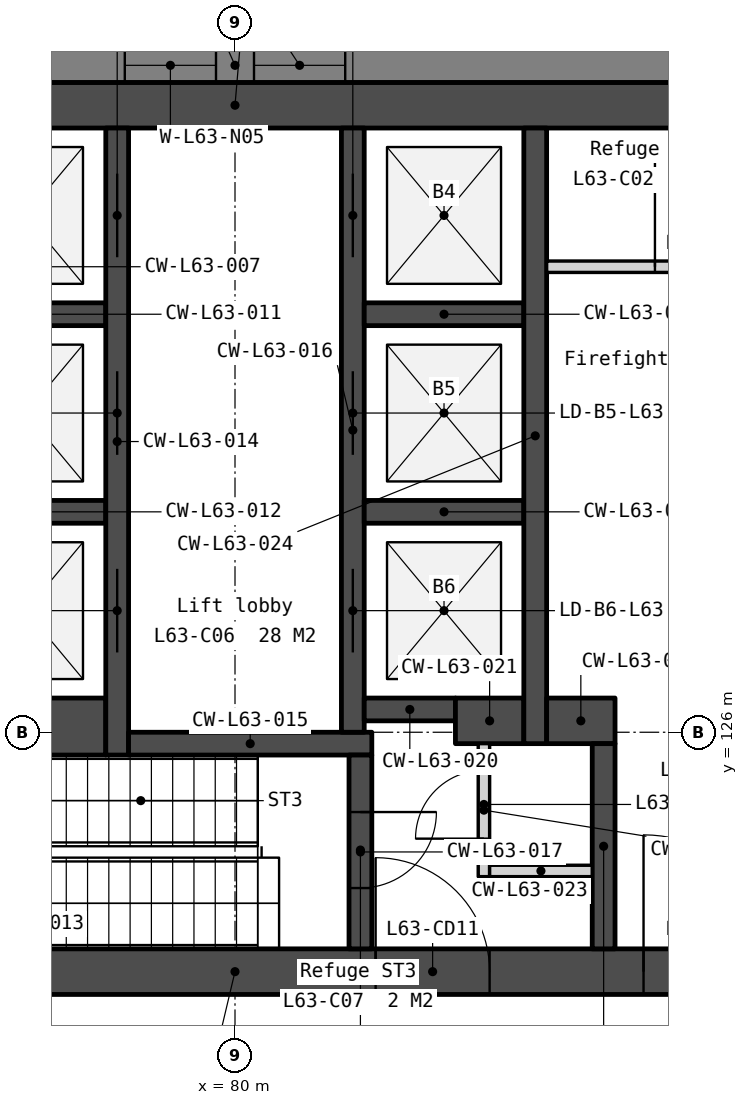
"""IFC4 building model, lengths in metres.
Left out: names, types, materials, properties, quantities, classifications, styles, units other than length and angle.
Written with IfcOpenShell. Run it as: python <this file> out.ifc"""

import sys

from ifc_helpers import new_model, si_unit, direction, frame, frame_2d, origin, place, context, subcontext, project, spatial, polyline, rectangle, outline, extrude, element, fill, save


model = new_model("IFC4")
c1 = context("Model", 3, precision=1e-05, world=origin(), true_north=direction((0.0, 1.0)))
c2 = subcontext(c1, "Body", "Model", "MODEL_VIEW")
j1 = project(units=[si_unit("LENGTHUNIT", "METRE"), si_unit("PLANEANGLEUNIT", "RADIAN")], contexts=[c1])
p1 = place(None, origin())
s1 = spatial("IfcSite", under=j1, at=p1, CompositionType="ELEMENT")
p2 = place(p1, origin())
s2 = spatial("IfcBuilding", under=s1, at=p2, CompositionType="ELEMENT")
p3 = place(p2, frame((0.0, 0.0, 258.2)))
s3 = spatial("IfcBuildingStorey", under=s2, at=p3, CompositionType="ELEMENT", Elevation=258.2)
p4 = place(p3, frame((69.0, 134.25, 0.0), z_axis=(0.0, 0.0, 1.0), x_axis=(1.0, 0.0, 0.0)))
e1 = element("IfcWall", 1, at=p4, inside=s3, PredefinedType="SOLIDWALL", context=c2, shape_type="SweptSolid", body=[
    extrude(rectangle(XDim=22.0, YDim=0.6, at=frame_2d((11.0, 0.0))), origin(), (0.0, 0.0, 1.0), 3.75),
])
p5 = place(p3, frame((69.0, 122.85, 0.0), z_axis=(0.0, 0.0, 1.0), x_axis=(1.0, 0.0, 0.0)))
e2 = element("IfcWall", 2, at=p5, inside=s3, PredefinedType="SOLIDWALL", context=c2, shape_type="SweptSolid", body=[
    extrude(rectangle(XDim=22.0, YDim=0.6, at=frame_2d((11.0, 0.0))), origin(), (0.0, 0.0, 1.0), 3.75),
])
p6 = place(p5, frame((16.375, 0.0, 0.0)))
e3 = element("IfcOpeningElement", 3, at=p6, cuts=e2, PredefinedType="OPENING", context=c2, shape_type="SweptSolid", body=[
    extrude(rectangle(XDim=1.8, YDim=2.1, at=frame_2d((0.9, 1.05))), frame((0.0, 0.31, 0.0), z_axis=(0.0, -1.0, 0.0), x_axis=(1.0, 0.0, 0.0)), (0.0, 0.0, 1.0), 0.62),
])
p7 = place(p5, frame((3.825, 0.0, 0.0)))
e4 = element("IfcOpeningElement", 4, at=p7, cuts=e2, PredefinedType="OPENING", context=c2, shape_type="SweptSolid", body=[
    extrude(rectangle(XDim=1.8, YDim=2.1, at=frame_2d((0.9, 1.05))), frame((0.0, 0.31, 0.0), z_axis=(0.0, -1.0, 0.0), x_axis=(1.0, 0.0, 0.0)), (0.0, 0.0, 1.0), 0.62),
])
p8 = place(p5, frame((12.85, 0.0, 0.0)))
e5 = element("IfcOpeningElement", 5, at=p8, cuts=e2, PredefinedType="OPENING", context=c2, shape_type="SweptSolid", body=[
    extrude(rectangle(XDim=1.5, YDim=2.1, at=frame_2d((0.75, 1.05))), frame((0.0, 0.31, 0.0), z_axis=(0.0, -1.0, 0.0), x_axis=(1.0, 0.0, 0.0)), (0.0, 0.0, 1.0), 0.62),
])
for number, where, z_axis, x_axis in (
    (6, (76.2, 131.5, 0.0), (0.0, 0.0, 1.0), (1.0, 0.0, 0.0)),
    (7, (76.2, 128.9, 0.0), (0.0, 0.0, 1.0), (1.0, 0.0, 0.0)),
):
    element("IfcWall", number, at=place(p3, frame(where, z_axis=z_axis, x_axis=x_axis)), inside=s3, PredefinedType="SOLIDWALL", context=c2, shape_type="SweptSolid", body=[
        extrude(rectangle(XDim=2.1, YDim=0.3, at=frame_2d((1.05, 0.0))), origin(), (0.0, 0.0, 1.0), 3.75),
    ])
p9 = place(p3, frame((76.2, 126.075, 0.0), z_axis=(0.0, 0.0, 1.0), x_axis=(1.0, 0.0, 0.0)))
e8 = element("IfcWall", 8, at=p9, inside=s3, PredefinedType="SOLIDWALL", context=c2, shape_type="SweptSolid", body=[
    extrude(rectangle(XDim=2.1, YDim=0.75, at=frame_2d((1.05, 0.0))), origin(), (0.0, 0.0, 1.0), 3.75),
])
p10 = place(p3, frame((78.45, 133.95, 0.0), z_axis=(0.0, 0.0, 1.0), x_axis=(0.0, -1.0, 0.0)))
e9 = element("IfcWall", 9, at=p10, inside=s3, PredefinedType="SOLIDWALL", context=c2, shape_type="SweptSolid", body=[
    extrude(rectangle(XDim=8.25, YDim=0.3, at=frame_2d((4.125, 0.0))), origin(), (0.0, 0.0, 1.0), 3.75),
])
p11 = place(p10, frame((0.6, 0.0, 0.0)))
e10 = element("IfcOpeningElement", 10, at=p11, cuts=e9, PredefinedType="OPENING", context=c2, shape_type="SweptSolid", body=[
    extrude(rectangle(XDim=1.1, YDim=2.1, at=frame_2d((0.55, 1.05))), frame((0.0, 0.16, 0.0), z_axis=(0.0, -1.0, 0.0), x_axis=(1.0, 0.0, 0.0)), (0.0, 0.0, 1.0), 0.32),
])
p12 = place(p10, frame((3.2, 0.0, 0.0)))
e11 = element("IfcOpeningElement", 11, at=p12, cuts=e9, PredefinedType="OPENING", context=c2, shape_type="SweptSolid", body=[
    extrude(rectangle(XDim=1.1, YDim=2.1, at=frame_2d((0.55, 1.05))), frame((0.0, 0.16, 0.0), z_axis=(0.0, -1.0, 0.0), x_axis=(1.0, 0.0, 0.0)), (0.0, 0.0, 1.0), 0.32),
])
p13 = place(p10, frame((5.8, 0.0, 0.0)))
e12 = element("IfcOpeningElement", 12, at=p13, cuts=e9, PredefinedType="OPENING", context=c2, shape_type="SweptSolid", body=[
    extrude(rectangle(XDim=1.1, YDim=2.1, at=frame_2d((0.55, 1.05))), frame((0.0, 0.16, 0.0), z_axis=(0.0, -1.0, 0.0), x_axis=(1.0, 0.0, 0.0)), (0.0, 0.0, 1.0), 0.32),
])
p14 = place(p3, frame((78.6, 125.85, 0.0), z_axis=(0.0, 0.0, 1.0), x_axis=(1.0, 0.0, 0.0)))
e13 = element("IfcWall", 13, at=p14, inside=s3, PredefinedType="SOLIDWALL", context=c2, shape_type="SweptSolid", body=[
    extrude(rectangle(XDim=3.2, YDim=0.3, at=frame_2d((1.6, 0.0))), origin(), (0.0, 0.0, 1.0), 3.75),
])
p15 = place(p3, frame((81.55, 133.95, 0.0), z_axis=(0.0, 0.0, 1.0), x_axis=(0.0, -1.0, 0.0)))
e14 = element("IfcWall", 14, at=p15, inside=s3, PredefinedType="SOLIDWALL", context=c2, shape_type="SweptSolid", body=[
    extrude(rectangle(XDim=7.95, YDim=0.3, at=frame_2d((3.975, 0.0))), origin(), (0.0, 0.0, 1.0), 3.75),
])
p16 = place(p15, frame((0.6, 0.0, 0.0)))
e15 = element("IfcOpeningElement", 15, at=p16, cuts=e14, PredefinedType="OPENING", context=c2, shape_type="SweptSolid", body=[
    extrude(rectangle(XDim=1.1, YDim=2.1, at=frame_2d((0.55, 1.05))), frame((0.0, 0.16, 0.0), z_axis=(0.0, -1.0, 0.0), x_axis=(1.0, 0.0, 0.0)), (0.0, 0.0, 1.0), 0.32),
])
p17 = place(p15, frame((3.2, 0.0, 0.0)))
e16 = element("IfcOpeningElement", 16, at=p17, cuts=e14, PredefinedType="OPENING", context=c2, shape_type="SweptSolid", body=[
    extrude(rectangle(XDim=1.1, YDim=2.1, at=frame_2d((0.55, 1.05))), frame((0.0, 0.16, 0.0), z_axis=(0.0, -1.0, 0.0), x_axis=(1.0, 0.0, 0.0)), (0.0, 0.0, 1.0), 0.32),
])
p18 = place(p15, frame((5.8, 0.0, 0.0)))
e17 = element("IfcOpeningElement", 17, at=p18, cuts=e14, PredefinedType="OPENING", context=c2, shape_type="SweptSolid", body=[
    extrude(rectangle(XDim=1.1, YDim=2.1, at=frame_2d((0.55, 1.05))), frame((0.0, 0.16, 0.0), z_axis=(0.0, -1.0, 0.0), x_axis=(1.0, 0.0, 0.0)), (0.0, 0.0, 1.0), 0.32),
])
p19 = place(p3, frame((81.65, 125.7, 0.0), z_axis=(0.0, 0.0, 1.0), x_axis=(0.0, -1.0, 0.0)))
e18 = element("IfcWall", 18, at=p19, inside=s3, PredefinedType="SOLIDWALL", context=c2, shape_type="SweptSolid", body=[
    extrude(rectangle(XDim=2.55, YDim=0.3, at=frame_2d((1.275, 0.0))), origin(), (0.0, 0.0, 1.0), 3.75),
])
p20 = place(p19, frame((0.75, 0.0, 0.0)))
e19 = element("IfcOpeningElement", 19, at=p20, cuts=e18, PredefinedType="OPENING", context=c2, shape_type="SweptSolid", body=[
    extrude(rectangle(XDim=1.0, YDim=2.1, at=frame_2d((0.5, 1.05))), frame((0.0, 0.16, 0.0), z_axis=(0.0, -1.0, 0.0), x_axis=(1.0, 0.0, 0.0)), (0.0, 0.0, 1.0), 0.32),
])
for number, where, z_axis, x_axis in (
    (20, (81.7, 131.5, 0.0), (0.0, 0.0, 1.0), (1.0, 0.0, 0.0)),
    (21, (81.7, 128.9, 0.0), (0.0, 0.0, 1.0), (1.0, 0.0, 0.0)),
):
    element("IfcWall", number, at=place(p3, frame(where, z_axis=z_axis, x_axis=x_axis)), inside=s3, PredefinedType="SOLIDWALL", context=c2, shape_type="SweptSolid", body=[
        extrude(rectangle(XDim=2.1, YDim=0.3, at=frame_2d((1.05, 0.0))), origin(), (0.0, 0.0, 1.0), 3.75),
    ])
p21 = place(p3, frame((81.7, 126.3, 0.0), z_axis=(0.0, 0.0, 1.0), x_axis=(1.0, 0.0, 0.0)))
e22 = element("IfcWall", 22, at=p21, inside=s3, PredefinedType="SOLIDWALL", context=c2, shape_type="SweptSolid", body=[
    extrude(rectangle(XDim=1.2, YDim=0.3, at=frame_2d((0.6, 0.0))), origin(), (0.0, 0.0, 1.0), 3.75),
])
p22 = place(p3, frame((82.9, 126.15, 0.0), z_axis=(0.0, 0.0, 1.0), x_axis=(1.0, 0.0, 0.0)))
e23 = element("IfcWall", 23, at=p22, inside=s3, PredefinedType="SOLIDWALL", context=c2, shape_type="SweptSolid", body=[
    extrude(rectangle(XDim=0.9, YDim=0.6, at=frame_2d((0.45, 0.0))), origin(), (0.0, 0.0, 1.0), 3.75),
])
p23 = place(p3, frame((83.275, 125.85, 0.0), z_axis=(0.0, 0.0, 1.0), x_axis=(0.0, -1.0, 0.0)))
e24 = element("IfcWall", 24, at=p23, inside=s3, PredefinedType="PARTITIONING", context=c2, shape_type="SweptSolid", body=[
    extrude(rectangle(XDim=1.75, YDim=0.15, at=frame_2d((0.875, 0.0))), origin(), (0.0, 0.0, 1.0), 3.75),
])
p24 = place(p23, frame((0.35, 0.0, 0.0)))
e25 = element("IfcOpeningElement", 25, at=p24, cuts=e24, PredefinedType="OPENING", context=c2, shape_type="SweptSolid", body=[
    extrude(rectangle(XDim=0.9, YDim=2.1, at=frame_2d((0.45, 1.05))), frame((0.0, 0.085, 0.0), z_axis=(0.0, -1.0, 0.0), x_axis=(1.0, 0.0, 0.0)), (0.0, 0.0, 1.0), 0.17),
])
p25 = place(p3, frame((83.35, 124.175, 0.0), z_axis=(0.0, 0.0, 1.0), x_axis=(1.0, 0.0, 0.0)))
e26 = element("IfcWall", 26, at=p25, inside=s3, PredefinedType="PARTITIONING", context=c2, shape_type="SweptSolid", body=[
    extrude(rectangle(XDim=1.35, YDim=0.15, at=frame_2d((0.675, 0.0))), origin(), (0.0, 0.0, 1.0), 3.75),
])
p26 = place(p3, frame((83.95, 133.95, 0.0), z_axis=(0.0, 0.0, 1.0), x_axis=(0.0, -1.0, 0.0)))
e27 = element("IfcWall", 27, at=p26, inside=s3, PredefinedType="SOLIDWALL", context=c2, shape_type="SweptSolid", body=[
    extrude(rectangle(XDim=8.1, YDim=0.3, at=frame_2d((4.05, 0.0))), origin(), (0.0, 0.0, 1.0), 3.75),
])
p27 = place(p3, frame((84.1, 132.125, 0.0), z_axis=(0.0, 0.0, 1.0), x_axis=(1.0, 0.0, 0.0)))
e28 = element("IfcWall", 28, at=p27, inside=s3, PredefinedType="PARTITIONING", context=c2, shape_type="SweptSolid", body=[
    extrude(rectangle(XDim=3.45, YDim=0.15, at=frame_2d((1.725, 0.0))), origin(), (0.0, 0.0, 1.0), 3.75),
])
p28 = place(p27, frame((1.425, 0.0, 0.0)))
e29 = element("IfcOpeningElement", 29, at=p28, cuts=e28, PredefinedType="OPENING", context=c2, shape_type="SweptSolid", body=[
    extrude(rectangle(XDim=1.5, YDim=2.1, at=frame_2d((0.75, 1.05))), frame((0.0, 0.085, 0.0), z_axis=(0.0, -1.0, 0.0), x_axis=(1.0, 0.0, 0.0)), (0.0, 0.0, 1.0), 0.17),
])
p29 = place(p3, frame((84.1, 126.15, 0.0), z_axis=(0.0, 0.0, 1.0), x_axis=(1.0, 0.0, 0.0)))
e30 = element("IfcWall", 30, at=p29, inside=s3, PredefinedType="SOLIDWALL", context=c2, shape_type="SweptSolid", body=[
    extrude(rectangle(XDim=0.9, YDim=0.6, at=frame_2d((0.45, 0.0))), origin(), (0.0, 0.0, 1.0), 3.75),
])
p30 = place(p3, frame((84.85, 125.85, 0.0), z_axis=(0.0, 0.0, 1.0), x_axis=(0.0, -1.0, 0.0)))
e31 = element("IfcWall", 31, at=p30, inside=s3, PredefinedType="SOLIDWALL", context=c2, shape_type="SweptSolid", body=[
    extrude(rectangle(XDim=2.7, YDim=0.3, at=frame_2d((1.35, 0.0))), origin(), (0.0, 0.0, 1.0), 3.75),
])
p31 = place(p3, frame((98.486, 134.775, -0.15), z_axis=(0.0, 0.0, 1.0), x_axis=(-1.0, 0.0, 0.0)))
e32 = element("IfcWall", 32, at=p31, inside=s3, PredefinedType="SOLIDWALL", context=c2, shape_type="SweptSolid", body=[
    extrude(outline(polyline([(36.972, 0.0), (36.972, 3.9), (0.0, 3.9), (0.0, 0.0), (36.972, 0.0)])), frame((0.0, 0.225, 0.0), z_axis=(0.0, -1.0, 0.0), x_axis=(1.0, 0.0, 0.0)), (0.0, 0.0, 1.0), 0.45),
])
p32 = place(p31, frame((0.715, 0.0, 0.95)))
e33 = element("IfcOpeningElement", 33, at=p32, cuts=e32, PredefinedType="OPENING", context=c2, shape_type="SweptSolid", body=[
    extrude(rectangle(XDim=1.2, YDim=2.2, at=frame_2d((0.6, 1.1))), frame((0.0, 0.235, 0.0), z_axis=(0.0, -1.0, 0.0), x_axis=(1.0, 0.0, 0.0)), (0.0, 0.0, 1.0), 0.47),
])
p33 = place(p31, frame((7.793, 0.0, 0.95)))
e34 = element("IfcOpeningElement", 34, at=p33, cuts=e32, PredefinedType="OPENING", context=c2, shape_type="SweptSolid", body=[
    extrude(rectangle(XDim=1.2, YDim=2.2, at=frame_2d((0.6, 1.1))), frame((0.0, 0.235, 0.0), z_axis=(0.0, -1.0, 0.0), x_axis=(1.0, 0.0, 0.0)), (0.0, 0.0, 1.0), 0.47),
])
p34 = place(p31, frame((9.493, 0.0, 0.95)))
e35 = element("IfcOpeningElement", 35, at=p34, cuts=e32, PredefinedType="OPENING", context=c2, shape_type="SweptSolid", body=[
    extrude(rectangle(XDim=1.2, YDim=2.2, at=frame_2d((0.6, 1.1))), frame((0.0, 0.235, 0.0), z_axis=(0.0, -1.0, 0.0), x_axis=(1.0, 0.0, 0.0)), (0.0, 0.0, 1.0), 0.47),
])
p35 = place(p31, frame((17.036, 0.0, 0.95)))
e36 = element("IfcOpeningElement", 36, at=p35, cuts=e32, PredefinedType="OPENING", context=c2, shape_type="SweptSolid", body=[
    extrude(rectangle(XDim=1.2, YDim=2.2, at=frame_2d((0.6, 1.1))), frame((0.0, 0.235, 0.0), z_axis=(0.0, -1.0, 0.0), x_axis=(1.0, 0.0, 0.0)), (0.0, 0.0, 1.0), 0.47),
])
p36 = place(p31, frame((18.736, 0.0, 0.95)))
e37 = element("IfcOpeningElement", 37, at=p36, cuts=e32, PredefinedType="OPENING", context=c2, shape_type="SweptSolid", body=[
    extrude(rectangle(XDim=1.2, YDim=2.2, at=frame_2d((0.6, 1.1))), frame((0.0, 0.235, 0.0), z_axis=(0.0, -1.0, 0.0), x_axis=(1.0, 0.0, 0.0)), (0.0, 0.0, 1.0), 0.47),
])
p37 = place(p31, frame((26.279, 0.0, 0.95)))
e38 = element("IfcOpeningElement", 38, at=p37, cuts=e32, PredefinedType="OPENING", context=c2, shape_type="SweptSolid", body=[
    extrude(rectangle(XDim=1.2, YDim=2.2, at=frame_2d((0.6, 1.1))), frame((0.0, 0.235, 0.0), z_axis=(0.0, -1.0, 0.0), x_axis=(1.0, 0.0, 0.0)), (0.0, 0.0, 1.0), 0.47),
])
p38 = place(p31, frame((27.979, 0.0, 0.95)))
e39 = element("IfcOpeningElement", 39, at=p38, cuts=e32, PredefinedType="OPENING", context=c2, shape_type="SweptSolid", body=[
    extrude(rectangle(XDim=1.2, YDim=2.2, at=frame_2d((0.6, 1.1))), frame((0.0, 0.235, 0.0), z_axis=(0.0, -1.0, 0.0), x_axis=(1.0, 0.0, 0.0)), (0.0, 0.0, 1.0), 0.47),
])
p39 = place(p31, frame((35.058, 0.0, 0.95)))
e40 = element("IfcOpeningElement", 40, at=p39, cuts=e32, PredefinedType="OPENING", context=c2, shape_type="SweptSolid", body=[
    extrude(rectangle(XDim=1.2, YDim=2.2, at=frame_2d((0.6, 1.1))), frame((0.0, 0.235, 0.0), z_axis=(0.0, -1.0, 0.0), x_axis=(1.0, 0.0, 0.0)), (0.0, 0.0, 1.0), 0.47),
])
p40 = place(p3, frame((80.905, 101.188, -0.15), z_axis=(0.0, 0.0, 1.0), x_axis=(0.500002536638, 0.866023939251, 0.0)))
e41 = element("IfcWall", 41, at=p40, inside=s3, PredefinedType="SOLIDWALL", context=c2, shape_type="SweptSolid", body=[
    extrude(outline(polyline([(36.972, 0.0), (36.972, 3.9), (0.0, 3.9), (0.0, 0.0), (36.972, 0.0)])), frame((0.0, 0.225, 0.0), z_axis=(0.0, -1.0, 0.0), x_axis=(1.0, 0.0, 0.0)), (0.0, 0.0, 1.0), 0.45),
])
p41 = place(p40, frame((0.715, 0.0, 0.95)))
e42 = element("IfcOpeningElement", 42, at=p41, cuts=e41, PredefinedType="OPENING", context=c2, shape_type="SweptSolid", body=[
    extrude(rectangle(XDim=1.2, YDim=2.2, at=frame_2d((0.6, 1.1))), frame((0.0, 0.235, 0.0), z_axis=(0.0, -1.0, 0.0), x_axis=(1.0, 0.0, 0.0)), (0.0, 0.0, 1.0), 0.47),
])
p42 = place(p40, frame((7.793, 0.0, 0.95)))
e43 = element("IfcOpeningElement", 43, at=p42, cuts=e41, PredefinedType="OPENING", context=c2, shape_type="SweptSolid", body=[
    extrude(rectangle(XDim=1.2, YDim=2.2, at=frame_2d((0.6, 1.1))), frame((0.0, 0.235, 0.0), z_axis=(0.0, -1.0, 0.0), x_axis=(1.0, 0.0, 0.0)), (0.0, 0.0, 1.0), 0.47),
])
p43 = place(p40, frame((9.493, 0.0, 0.95)))
e44 = element("IfcOpeningElement", 44, at=p43, cuts=e41, PredefinedType="OPENING", context=c2, shape_type="SweptSolid", body=[
    extrude(rectangle(XDim=1.2, YDim=2.2, at=frame_2d((0.6, 1.1))), frame((0.0, 0.235, 0.0), z_axis=(0.0, -1.0, 0.0), x_axis=(1.0, 0.0, 0.0)), (0.0, 0.0, 1.0), 0.47),
])
p44 = place(p40, frame((17.036, 0.0, 0.95)))
e45 = element("IfcOpeningElement", 45, at=p44, cuts=e41, PredefinedType="OPENING", context=c2, shape_type="SweptSolid", body=[
    extrude(rectangle(XDim=1.2, YDim=2.2, at=frame_2d((0.6, 1.1))), frame((0.0, 0.235, 0.0), z_axis=(0.0, -1.0, 0.0), x_axis=(1.0, 0.0, 0.0)), (0.0, 0.0, 1.0), 0.47),
])
p45 = place(p40, frame((18.736, 0.0, 0.95)))
e46 = element("IfcOpeningElement", 46, at=p45, cuts=e41, PredefinedType="OPENING", context=c2, shape_type="SweptSolid", body=[
    extrude(rectangle(XDim=1.2, YDim=2.2, at=frame_2d((0.6, 1.1))), frame((0.0, 0.235, 0.0), z_axis=(0.0, -1.0, 0.0), x_axis=(1.0, 0.0, 0.0)), (0.0, 0.0, 1.0), 0.47),
])
p46 = place(p40, frame((26.279, 0.0, 0.95)))
e47 = element("IfcOpeningElement", 47, at=p46, cuts=e41, PredefinedType="OPENING", context=c2, shape_type="SweptSolid", body=[
    extrude(rectangle(XDim=1.2, YDim=2.2, at=frame_2d((0.6, 1.1))), frame((0.0, 0.235, 0.0), z_axis=(0.0, -1.0, 0.0), x_axis=(1.0, 0.0, 0.0)), (0.0, 0.0, 1.0), 0.47),
])
p47 = place(p40, frame((27.979, 0.0, 0.95)))
e48 = element("IfcOpeningElement", 48, at=p47, cuts=e41, PredefinedType="OPENING", context=c2, shape_type="SweptSolid", body=[
    extrude(rectangle(XDim=1.2, YDim=2.2, at=frame_2d((0.6, 1.1))), frame((0.0, 0.235, 0.0), z_axis=(0.0, -1.0, 0.0), x_axis=(1.0, 0.0, 0.0)), (0.0, 0.0, 1.0), 0.47),
])
p48 = place(p40, frame((35.058, 0.0, 0.95)))
e49 = element("IfcOpeningElement", 49, at=p48, cuts=e41, PredefinedType="OPENING", context=c2, shape_type="SweptSolid", body=[
    extrude(rectangle(XDim=1.2, YDim=2.2, at=frame_2d((0.6, 1.1))), frame((0.0, 0.235, 0.0), z_axis=(0.0, -1.0, 0.0), x_axis=(1.0, 0.0, 0.0)), (0.0, 0.0, 1.0), 0.47),
])
p49 = place(p11, origin())
e50 = element("IfcDoor", 50, at=p49, inside=s3, OperationType="SLIDING_TO_RIGHT", PredefinedType="DOOR", context=c2, shape_type="SweptSolid", body=[
    extrude(rectangle(XDim=1.1, YDim=2.1, at=frame_2d((0.55, 1.05))), frame((0.0, 0.025, 0.0), z_axis=(0.0, -1.0, 0.0), x_axis=(1.0, 0.0, 0.0)), (0.0, 0.0, 1.0), 0.05),
])
fill(e10, e50)
p50 = place(p12, origin())
e51 = element("IfcDoor", 51, at=p50, inside=s3, OperationType="SLIDING_TO_RIGHT", PredefinedType="DOOR", context=c2, shape_type="SweptSolid", body=[
    extrude(rectangle(XDim=1.1, YDim=2.1, at=frame_2d((0.55, 1.05))), frame((0.0, 0.025, 0.0), z_axis=(0.0, -1.0, 0.0), x_axis=(1.0, 0.0, 0.0)), (0.0, 0.0, 1.0), 0.05),
])
fill(e11, e51)
p51 = place(p13, origin())
e52 = element("IfcDoor", 52, at=p51, inside=s3, OperationType="SLIDING_TO_RIGHT", PredefinedType="DOOR", context=c2, shape_type="SweptSolid", body=[
    extrude(rectangle(XDim=1.1, YDim=2.1, at=frame_2d((0.55, 1.05))), frame((0.0, 0.025, 0.0), z_axis=(0.0, -1.0, 0.0), x_axis=(1.0, 0.0, 0.0)), (0.0, 0.0, 1.0), 0.05),
])
fill(e12, e52)
p52 = place(p16, origin())
e53 = element("IfcDoor", 53, at=p52, inside=s3, OperationType="SLIDING_TO_LEFT", PredefinedType="DOOR", context=c2, shape_type="SweptSolid", body=[
    extrude(rectangle(XDim=1.1, YDim=2.1, at=frame_2d((0.55, 1.05))), frame((0.0, 0.025, 0.0), z_axis=(0.0, -1.0, 0.0), x_axis=(1.0, 0.0, 0.0)), (0.0, 0.0, 1.0), 0.05),
])
fill(e15, e53)
p53 = place(p17, origin())
e54 = element("IfcDoor", 54, at=p53, inside=s3, OperationType="SLIDING_TO_LEFT", PredefinedType="DOOR", context=c2, shape_type="SweptSolid", body=[
    extrude(rectangle(XDim=1.1, YDim=2.1, at=frame_2d((0.55, 1.05))), frame((0.0, 0.025, 0.0), z_axis=(0.0, -1.0, 0.0), x_axis=(1.0, 0.0, 0.0)), (0.0, 0.0, 1.0), 0.05),
])
fill(e16, e54)
p54 = place(p18, origin())
e55 = element("IfcDoor", 55, at=p54, inside=s3, OperationType="SLIDING_TO_LEFT", PredefinedType="DOOR", context=c2, shape_type="SweptSolid", body=[
    extrude(rectangle(XDim=1.1, YDim=2.1, at=frame_2d((0.55, 1.05))), frame((0.0, 0.025, 0.0), z_axis=(0.0, -1.0, 0.0), x_axis=(1.0, 0.0, 0.0)), (0.0, 0.0, 1.0), 0.05),
])
fill(e17, e55)
p55 = place(p6, origin())
e56 = element("IfcDoor", 56, at=p55, inside=s3, OperationType="DOUBLE_DOOR_DOUBLE_SWING", PredefinedType="DOOR", context=c2, shape_type="SweptSolid", body=[
    extrude(rectangle(XDim=1.8, YDim=2.1, at=frame_2d((0.9, 1.05))), frame((0.0, 0.025, 0.0), z_axis=(0.0, -1.0, 0.0), x_axis=(1.0, 0.0, 0.0)), (0.0, 0.0, 1.0), 0.05),
])
fill(e3, e56)
p56 = place(p8, origin())
e57 = element("IfcDoor", 57, at=p56, inside=s3, OperationType="DOUBLE_DOOR_DOUBLE_SWING", PredefinedType="DOOR", context=c2, shape_type="SweptSolid", body=[
    extrude(rectangle(XDim=1.5, YDim=2.1, at=frame_2d((0.75, 1.05))), frame((0.0, 0.025, 0.0), z_axis=(0.0, -1.0, 0.0), x_axis=(1.0, 0.0, 0.0)), (0.0, 0.0, 1.0), 0.05),
])
fill(e5, e57)
p57 = place(p24, origin())
e58 = element("IfcDoor", 58, at=p57, inside=s3, OperationType="SINGLE_SWING_RIGHT", PredefinedType="DOOR", context=c2, shape_type="SweptSolid", body=[
    extrude(rectangle(XDim=0.9, YDim=2.1, at=frame_2d((0.45, 1.05))), frame((0.0, 0.025, 0.0), z_axis=(0.0, -1.0, 0.0), x_axis=(1.0, 0.0, 0.0)), (0.0, 0.0, 1.0), 0.05),
])
fill(e25, e58)
p58 = place(p28, origin())
e59 = element("IfcDoor", 59, at=p58, inside=s3, OperationType="DOUBLE_DOOR_DOUBLE_SWING", PredefinedType="DOOR", context=c2, shape_type="SweptSolid", body=[
    extrude(rectangle(XDim=1.5, YDim=2.1, at=frame_2d((0.75, 1.05))), frame((0.0, 0.025, 0.0), z_axis=(0.0, -1.0, 0.0), x_axis=(1.0, 0.0, 0.0)), (0.0, 0.0, 1.0), 0.05),
])
fill(e29, e59)
p59 = place(p20, origin())
e60 = element("IfcDoor", 60, at=p59, inside=s3, OperationType="SINGLE_SWING_LEFT", PredefinedType="DOOR", context=c2, shape_type="SweptSolid", body=[
    extrude(rectangle(XDim=1.0, YDim=2.1, at=frame_2d((0.5, 1.05))), frame((0.0, 0.025, 0.0), z_axis=(0.0, -1.0, 0.0), x_axis=(1.0, 0.0, 0.0)), (0.0, 0.0, 1.0), 0.05),
])
fill(e19, e60)
p60 = place(p35, origin())
e61 = element("IfcWindow", 61, at=p60, inside=s3, PartitioningType="SINGLE_PANEL", PredefinedType="WINDOW", context=c2, shape_type="SweptSolid", body=[
    extrude(rectangle(XDim=1.2, YDim=2.2, at=frame_2d((0.6, 1.1))), frame((0.0, 0.03, 0.0), z_axis=(0.0, -1.0, 0.0), x_axis=(1.0, 0.0, 0.0)), (0.0, 0.0, 1.0), 0.06),
])
fill(e36, e61)
p61 = place(p36, origin())
e62 = element("IfcWindow", 62, at=p61, inside=s3, PartitioningType="SINGLE_PANEL", PredefinedType="WINDOW", context=c2, shape_type="SweptSolid", body=[
    extrude(rectangle(XDim=1.2, YDim=2.2, at=frame_2d((0.6, 1.1))), frame((0.0, 0.03, 0.0), z_axis=(0.0, -1.0, 0.0), x_axis=(1.0, 0.0, 0.0)), (0.0, 0.0, 1.0), 0.06),
])
fill(e37, e62)
save(model, sys.argv[1])
